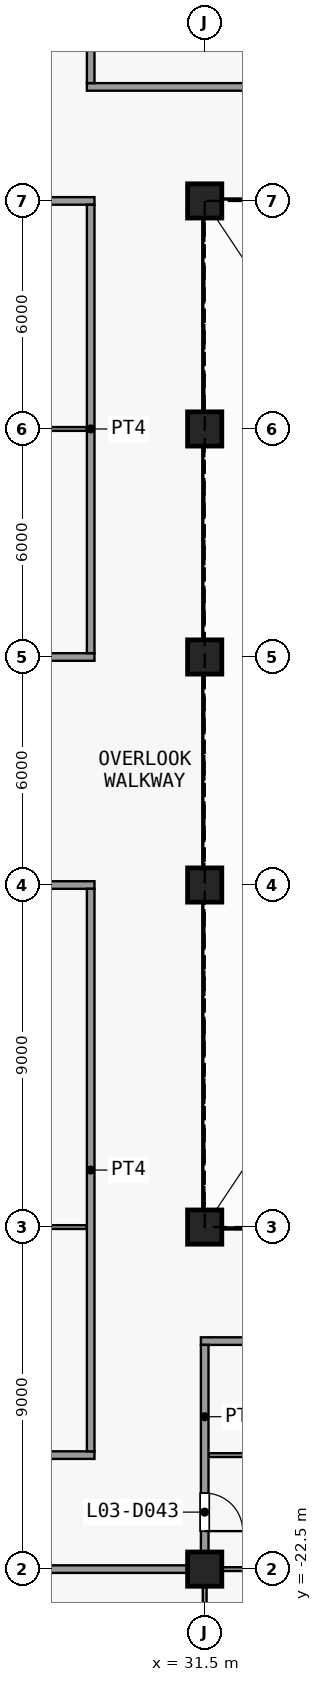
"""IFC4 building model, lengths in metres.
Left out: names, types, materials, properties, quantities, classifications, styles, units other than length and angle.
Written with IfcOpenShell. Run it as: python <this file> out.ifc"""

import sys

from ifc_helpers import new_model, si_unit, direction, frame, frame_2d, origin, origin_2d, place, context, subcontext, project, spatial, rectangle, extrude, element, fill, save


model = new_model("IFC4")
c1 = context("Model", 3, precision=1e-05, world=origin(), true_north=direction((0.0, 1.0)))
c2 = subcontext(c1, "Body", "Model", "MODEL_VIEW")
j1 = project(units=[si_unit("LENGTHUNIT", "METRE"), si_unit("PLANEANGLEUNIT", "RADIAN")], contexts=[c1])
p1 = place(None, origin())
s1 = spatial("IfcSite", under=j1, at=p1, CompositionType="ELEMENT")
p2 = place(p1, origin())
s2 = spatial("IfcBuilding", under=s1, at=p2, CompositionType="ELEMENT")
p3 = place(p2, frame((0.0, 0.0, 18.5)))
s3 = spatial("IfcBuildingStorey", under=s2, at=p3, CompositionType="ELEMENT", Elevation=18.5)
for number, where, z_axis, x_axis in (
    (1, (31.5, -22.5, 0.0), (0.0, 0.0, 1.0), (1.0, 0.0, 0.0)),
    (2, (31.5, -13.5, 0.0), (0.0, 0.0, 1.0), (1.0, 0.0, 0.0)),
    (3, (31.5, -4.5, 0.0), (0.0, 0.0, 1.0), (1.0, 0.0, 0.0)),
    (4, (31.5, 1.5, 0.0), (0.0, 0.0, 1.0), (1.0, 0.0, 0.0)),
    (5, (31.5, 7.5, 0.0), (0.0, 0.0, 1.0), (1.0, 0.0, 0.0)),
    (6, (31.5, 13.5, 0.0), (0.0, 0.0, 1.0), (1.0, 0.0, 0.0)),
):
    element("IfcColumn", number, at=place(p3, frame(where, z_axis=z_axis, x_axis=x_axis)), inside=s3, PredefinedType="COLUMN", context=c2, shape_type="SweptSolid", body=[
        extrude(rectangle(XDim=0.9, YDim=0.9, at=origin_2d()), origin(), (0.0, 0.0, 1.0), 5.0),
    ])
p4 = place(p3, frame((17.4, -22.5, 0.0), z_axis=(0.0, 0.0, 1.0), x_axis=(1.0, 0.0, 0.0)))
e7 = element("IfcWall", 7, at=p4, inside=s3, PredefinedType="PARTITIONING", context=c2, shape_type="SweptSolid", body=[
    extrude(rectangle(XDim=14.1, YDim=0.2, at=frame_2d((7.05, 0.0))), origin(), (0.0, 0.0, 1.0), 4.65),
])
p5 = place(p3, frame((31.5, -22.5, 0.0), z_axis=(0.0, 0.0, 1.0), x_axis=(1.0, 0.0, 0.0)))
e8 = element("IfcWall", 8, at=p5, inside=s3, PredefinedType="PARTITIONING", context=c2, shape_type="SweptSolid", body=[
    extrude(rectangle(XDim=20.95, YDim=0.1, at=frame_2d((10.475, 0.0))), origin(), (0.0, 0.0, 1.0), 4.65),
])
p6 = place(p3, frame((13.5, -19.5, 0.0), z_axis=(0.0, 0.0, 1.0), x_axis=(1.0, 0.0, 0.0)))
e9 = element("IfcWall", 9, at=p6, inside=s3, PredefinedType="PARTITIONING", context=c2, shape_type="SweptSolid", body=[
    extrude(rectangle(XDim=15.1, YDim=0.2, at=frame_2d((7.55, 0.0))), origin(), (0.0, 0.0, 1.0), 4.65),
])
p7 = place(p6, frame((7.0, 0.0, 0.0)))
e10 = element("IfcOpeningElement", 10, at=p7, cuts=e9, PredefinedType="OPENING", context=c2, shape_type="SweptSolid", body=[
    extrude(rectangle(XDim=1.0, YDim=2.1, at=frame_2d((0.5, 1.05))), frame((0.0, 0.11, 0.0), z_axis=(0.0, -1.0, 0.0), x_axis=(1.0, 0.0, 0.0)), (0.0, 0.0, 1.0), 0.22),
])
p8 = place(p3, frame((31.6, -19.5, 0.0), z_axis=(0.0, 0.0, 1.0), x_axis=(1.0, 0.0, 0.0)))
e11 = element("IfcWall", 11, at=p8, inside=s3, PredefinedType="PARTITIONING", context=c2, shape_type="SweptSolid", body=[
    extrude(rectangle(XDim=20.85, YDim=0.1, at=frame_2d((10.425, 0.0))), origin(), (0.0, 0.0, 1.0), 4.65),
])
p9 = place(p3, frame((31.4, -16.5, 0.0), z_axis=(0.0, 0.0, 1.0), x_axis=(1.0, 0.0, 0.0)))
e12 = element("IfcWall", 12, at=p9, inside=s3, PredefinedType="PARTITIONING", context=c2, shape_type="SweptSolid", body=[
    extrude(rectangle(XDim=21.0, YDim=0.2, at=frame_2d((10.5, 0.0))), origin(), (0.0, 0.0, 1.0), 4.65),
])
p10 = place(p9, frame((3.2, 0.0, 0.0)))
e13 = element("IfcOpeningElement", 13, at=p10, cuts=e12, PredefinedType="OPENING", context=c2, shape_type="SweptSolid", body=[
    extrude(rectangle(XDim=1.0, YDim=2.1, at=frame_2d((0.5, 1.05))), frame((0.0, 0.11, 0.0), z_axis=(0.0, -1.0, 0.0), x_axis=(1.0, 0.0, 0.0)), (0.0, 0.0, 1.0), 0.22),
])
p11 = place(p9, frame((14.0, 0.0, 0.0)))
e14 = element("IfcOpeningElement", 14, at=p11, cuts=e12, PredefinedType="OPENING", context=c2, shape_type="SweptSolid", body=[
    extrude(rectangle(XDim=1.0, YDim=2.1, at=frame_2d((0.5, 1.05))), frame((0.0, 0.11, 0.0), z_axis=(0.0, -1.0, 0.0), x_axis=(1.0, 0.0, 0.0)), (0.0, 0.0, 1.0), 0.22),
])
p12 = place(p3, frame((13.5, -13.5, 0.0), z_axis=(0.0, 0.0, 1.0), x_axis=(1.0, 0.0, 0.0)))
e15 = element("IfcWall", 15, at=p12, inside=s3, PredefinedType="PARTITIONING", context=c2, shape_type="SweptSolid", body=[
    extrude(rectangle(XDim=14.9, YDim=0.1, at=frame_2d((7.45, 0.0))), origin(), (0.0, 0.0, 1.0), 4.65),
])
p13 = place(p3, frame((13.4, -4.5, 0.0), z_axis=(0.0, 0.0, 1.0), x_axis=(1.0, 0.0, 0.0)))
e16 = element("IfcWall", 16, at=p13, inside=s3, PredefinedType="PARTITIONING", context=c2, shape_type="SweptSolid", body=[
    extrude(rectangle(XDim=15.2, YDim=0.2, at=frame_2d((7.6, 0.0))), origin(), (0.0, 0.0, 1.0), 4.65),
])
p14 = place(p13, frame((7.1, 0.0, 0.0)))
e17 = element("IfcOpeningElement", 17, at=p14, cuts=e16, PredefinedType="OPENING", context=c2, shape_type="SweptSolid", body=[
    extrude(rectangle(XDim=1.0, YDim=2.1, at=frame_2d((0.5, 1.05))), frame((0.0, 0.11, 0.0), z_axis=(0.0, -1.0, 0.0), x_axis=(1.0, 0.0, 0.0)), (0.0, 0.0, 1.0), 0.22),
])
p15 = place(p3, frame((20.3, 1.5, 0.0), z_axis=(0.0, 0.0, 1.0), x_axis=(1.0, 0.0, 0.0)))
e18 = element("IfcWall", 18, at=p15, inside=s3, PredefinedType="PARTITIONING", context=c2, shape_type="SweptSolid", body=[
    extrude(rectangle(XDim=8.3, YDim=0.2, at=frame_2d((4.15, 0.0))), origin(), (0.0, 0.0, 1.0), 4.65),
])
p16 = place(p15, frame((3.7, 0.0, 0.0)))
e19 = element("IfcOpeningElement", 19, at=p16, cuts=e18, PredefinedType="OPENING", context=c2, shape_type="SweptSolid", body=[
    extrude(rectangle(XDim=1.0, YDim=2.1, at=frame_2d((0.5, 1.05))), frame((0.0, 0.11, 0.0), z_axis=(0.0, -1.0, 0.0), x_axis=(1.0, 0.0, 0.0)), (0.0, 0.0, 1.0), 0.22),
])
p17 = place(p3, frame((20.5, 7.5, 0.0), z_axis=(0.0, 0.0, 1.0), x_axis=(1.0, 0.0, 0.0)))
e20 = element("IfcWall", 20, at=p17, inside=s3, PredefinedType="PARTITIONING", context=c2, shape_type="SweptSolid", body=[
    extrude(rectangle(XDim=7.9, YDim=0.1, at=frame_2d((3.95, 0.0))), origin(), (0.0, 0.0, 1.0), 4.65),
])
p18 = place(p3, frame((20.3, 13.5, 0.0), z_axis=(0.0, 0.0, 1.0), x_axis=(1.0, 0.0, 0.0)))
e21 = element("IfcWall", 21, at=p18, inside=s3, PredefinedType="PARTITIONING", context=c2, shape_type="SweptSolid", body=[
    extrude(rectangle(XDim=8.3, YDim=0.2, at=frame_2d((4.15, 0.0))), origin(), (0.0, 0.0, 1.0), 4.65),
])
p19 = place(p18, frame((3.7, 0.0, 0.0)))
e22 = element("IfcOpeningElement", 22, at=p19, cuts=e21, PredefinedType="OPENING", context=c2, shape_type="SweptSolid", body=[
    extrude(rectangle(XDim=1.0, YDim=2.1, at=frame_2d((0.5, 1.05))), frame((0.0, 0.11, 0.0), z_axis=(0.0, -1.0, 0.0), x_axis=(1.0, 0.0, 0.0)), (0.0, 0.0, 1.0), 0.22),
])
p20 = place(p3, frame((28.4, 16.5, 0.0), z_axis=(0.0, 0.0, 1.0), x_axis=(1.0, 0.0, 0.0)))
e23 = element("IfcWall", 23, at=p20, inside=s3, PredefinedType="PARTITIONING", context=c2, shape_type="SweptSolid", body=[
    extrude(rectangle(XDim=24.2, YDim=0.2, at=frame_2d((12.1, 0.0))), origin(), (0.0, 0.0, 1.0), 4.65),
])
p21 = place(p20, frame((6.2, 0.0, 0.0)))
e24 = element("IfcOpeningElement", 24, at=p21, cuts=e23, PredefinedType="OPENING", context=c2, shape_type="SweptSolid", body=[
    extrude(rectangle(XDim=1.0, YDim=2.1, at=frame_2d((0.5, 1.05))), frame((0.0, 0.11, 0.0), z_axis=(0.0, -1.0, 0.0), x_axis=(1.0, 0.0, 0.0)), (0.0, 0.0, 1.0), 0.22),
])
p22 = place(p20, frame((17.0, 0.0, 0.0)))
e25 = element("IfcOpeningElement", 25, at=p22, cuts=e23, PredefinedType="OPENING", context=c2, shape_type="SweptSolid", body=[
    extrude(rectangle(XDim=1.0, YDim=2.1, at=frame_2d((0.5, 1.05))), frame((0.0, 0.11, 0.0), z_axis=(0.0, -1.0, 0.0), x_axis=(1.0, 0.0, 0.0)), (0.0, 0.0, 1.0), 0.22),
])
p23 = place(p3, frame((28.5, -19.4, 0.0), z_axis=(0.0, 0.0, 1.0), x_axis=(0.0, 1.0, 0.0)))
e26 = element("IfcWall", 26, at=p23, inside=s3, PredefinedType="PARTITIONING", context=c2, shape_type="SweptSolid", body=[
    extrude(rectangle(XDim=14.8, YDim=0.2, at=frame_2d((7.4, 0.0))), origin(), (0.0, 0.0, 1.0), 4.65),
])
p24 = place(p3, frame((28.5, 1.6, 0.0), z_axis=(0.0, 0.0, 1.0), x_axis=(0.0, 1.0, 0.0)))
e27 = element("IfcWall", 27, at=p24, inside=s3, PredefinedType="PARTITIONING", context=c2, shape_type="SweptSolid", body=[
    extrude(rectangle(XDim=11.8, YDim=0.2, at=frame_2d((5.9, 0.0))), origin(), (0.0, 0.0, 1.0), 4.65),
])
p25 = place(p3, frame((28.5, 16.6, 0.0), z_axis=(0.0, 0.0, 1.0), x_axis=(0.0, 1.0, 0.0)))
e28 = element("IfcWall", 28, at=p25, inside=s3, PredefinedType="PARTITIONING", context=c2, shape_type="SweptSolid", body=[
    extrude(rectangle(XDim=2.8, YDim=0.2, at=frame_2d((1.4, 0.0))), origin(), (0.0, 0.0, 1.0), 4.65),
])
p26 = place(p3, frame((31.5, -22.4, 0.0), z_axis=(0.0, 0.0, 1.0), x_axis=(0.0, 1.0, 0.0)))
e29 = element("IfcWall", 29, at=p26, inside=s3, PredefinedType="PARTITIONING", context=c2, shape_type="SweptSolid", body=[
    extrude(rectangle(XDim=5.8, YDim=0.2, at=frame_2d((2.9, 0.0))), origin(), (0.0, 0.0, 1.0), 4.65),
])
p27 = place(p26, frame((0.9, 0.0, 0.0)))
e30 = element("IfcOpeningElement", 30, at=p27, cuts=e29, PredefinedType="OPENING", context=c2, shape_type="SweptSolid", body=[
    extrude(rectangle(XDim=1.0, YDim=2.1, at=frame_2d((0.5, 1.05))), frame((0.0, 0.11, 0.0), z_axis=(0.0, -1.0, 0.0), x_axis=(1.0, 0.0, 0.0)), (0.0, 0.0, 1.0), 0.22),
])
p28 = place(p3, frame((31.5, -31.4, 0.0), z_axis=(0.0, 0.0, 1.0), x_axis=(0.0, 1.0, 0.0)))
e31 = element("IfcWall", 31, at=p28, inside=s3, PredefinedType="PARTITIONING", context=c2, shape_type="SweptSolid", body=[
    extrude(rectangle(XDim=8.8, YDim=0.1, at=frame_2d((4.4, 0.0))), origin(), (0.0, 0.0, 1.0), 4.65),
])
p29 = place(p27, origin())
e32 = element("IfcDoor", 32, at=p29, inside=s3, OperationType="SINGLE_SWING_LEFT", PredefinedType="DOOR", context=c2, shape_type="SweptSolid", body=[
    extrude(rectangle(XDim=1.0, YDim=2.1, at=frame_2d((0.5, 1.05))), frame((0.0, 0.025, 0.0), z_axis=(0.0, -1.0, 0.0), x_axis=(1.0, 0.0, 0.0)), (0.0, 0.0, 1.0), 0.05),
])
fill(e30, e32)
save(model, sys.argv[1])
